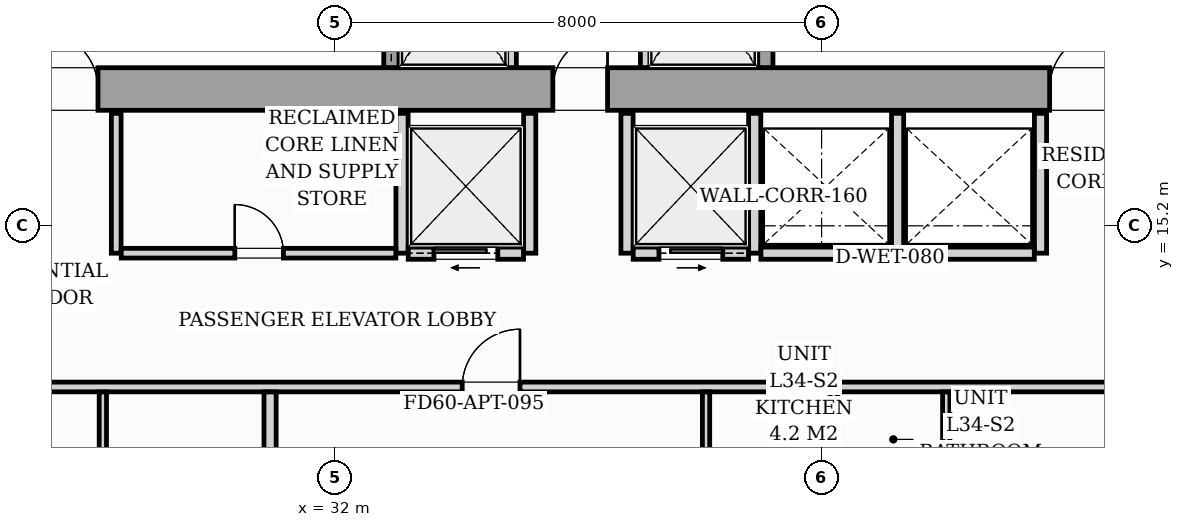
"""IFC4 building model, lengths in metres.
Left out: names, types, materials, properties, quantities, classifications, styles, units other than length and angle.
Written with IfcOpenShell. Run it as: python <this file> out.ifc"""

import sys

from ifc_helpers import new_model, si_unit, direction, frame, frame_2d, origin, origin_2d, place, context, subcontext, project, spatial, rectangle, i_section, extrude, source, transform, mapped, element, fill, save


model = new_model("IFC4")
c1 = context("Model", 3, precision=1e-05, world=origin(), true_north=direction((0.0, 1.0)))
c2 = subcontext(c1, "Body", "Model", "MODEL_VIEW")
j1 = project(units=[si_unit("LENGTHUNIT", "METRE"), si_unit("PLANEANGLEUNIT", "RADIAN")], contexts=[c1])
p1 = place(None, origin())
s1 = spatial("IfcSite", under=j1, at=p1, CompositionType="ELEMENT")
p2 = place(p1, origin())
s2 = spatial("IfcBuilding", under=s1, at=p2, CompositionType="ELEMENT")
p3 = place(p2, frame((0.0, 0.0, 119.4)))
s3 = spatial("IfcBuildingStorey", under=s2, at=p3, CompositionType="ELEMENT", Elevation=119.4)
m1 = source(origin(), c2, "Body", "SweptSolid", [
    extrude(i_section(OverallWidth=0.421, OverallDepth=0.465, WebThickness=0.045, FlangeThickness=0.073, FilletRadius=0.018, at=origin_2d()), origin(), (0.0, 0.0, 1.0), 5.196),
])
for number, where, z_axis, x_axis in (
    (1, (33.12, 17.4, 0.002), (0.0, 0.0, 1.0), (1.0, 0.0, 0.0)),
    (2, (38.88, 17.4, 0.002), (0.0, 0.0, 1.0), (1.0, 0.0, 0.0)),
):
    element("IfcColumn", number, at=place(p3, frame(where, z_axis=z_axis, x_axis=x_axis)), inside=s3, PredefinedType="PILASTER", context=c2, shape_type="MappedRepresentation", body=[
        mapped(m1, transform((0.0, 0.0, 0.0), scale=1.0)),
    ])
p4 = place(p3, frame((26.1, 17.45, 0.0), z_axis=(0.0, 0.0, 1.0), x_axis=(1.0, 0.0, 0.0)))
e3 = element("IfcWall", 3, at=p4, inside=s3, PredefinedType="SHEAR", context=c2, shape_type="SweptSolid", body=[
    extrude(rectangle(XDim=19.8, YDim=0.7, at=frame_2d((9.9, 0.0))), origin(), (0.0, 0.0, 1.0), 5.2),
])
p5 = place(p4, frame((1.05, 0.0, 0.0)))
e4 = element("IfcOpeningElement", 4, at=p5, cuts=e3, PredefinedType="OPENING", context=c2, shape_type="SweptSolid", body=[
    extrude(rectangle(XDim=0.95, YDim=2.06, at=frame_2d((0.475, 1.03))), frame((0.0, 0.36, 0.0), z_axis=(0.0, -1.0, 0.0), x_axis=(1.0, 0.0, 0.0)), (0.0, 0.0, 1.0), 0.72),
])
p6 = place(p4, frame((9.48, 0.0, 0.0)))
e5 = element("IfcOpeningElement", 5, at=p6, cuts=e3, PredefinedType="OPENING", context=c2, shape_type="SweptSolid", body=[
    extrude(rectangle(XDim=0.9, YDim=2.06, at=frame_2d((0.45, 1.03))), frame((0.0, 0.36, 0.0), z_axis=(0.0, -1.0, 0.0), x_axis=(1.0, 0.0, 0.0)), (0.0, 0.0, 1.0), 0.72),
])
p7 = place(p4, frame((17.65, 0.0, 0.0)))
e6 = element("IfcOpeningElement", 6, at=p7, cuts=e3, PredefinedType="OPENING", context=c2, shape_type="SweptSolid", body=[
    extrude(rectangle(XDim=0.95, YDim=2.06, at=frame_2d((0.475, 1.03))), frame((0.0, 0.36, 0.0), z_axis=(0.0, -1.0, 0.0), x_axis=(1.0, 0.0, 0.0)), (0.0, 0.0, 1.0), 0.72),
])
p8 = place(p3, frame((32.925, 17.802, 0.0), z_axis=(0.0, 0.0, 1.0), x_axis=(0.0, 1.0, 0.0)))
e7 = element("IfcWall", 7, at=p8, inside=s3, PredefinedType="SOLIDWALL", context=c2, shape_type="SweptSolid", body=[
    extrude(rectangle(XDim=2.646, YDim=0.25, at=frame_2d((1.323, 0.0))), origin(), (0.0, 0.0, 1.0), 5.2),
])
p9 = place(p8, frame((0.598, 0.0, 0.0)))
e8 = element("IfcOpeningElement", 8, at=p9, cuts=e7, PredefinedType="OPENING", context=c2, shape_type="SweptSolid", body=[
    extrude(rectangle(XDim=1.1, YDim=2.08, at=frame_2d((0.55, 1.04))), frame((0.0, 0.135, 0.0), z_axis=(0.0, -1.0, 0.0), x_axis=(1.0, 0.0, 0.0)), (0.0, 0.0, 1.0), 0.27),
])
for number, where, z_axis, x_axis in (
    (9, (34.9, 17.802, 0.0), (0.0, 0.0, 1.0), (0.0, 1.0, 0.0)),
    (10, (37.1, 17.802, 0.0), (0.0, 0.0, 1.0), (0.0, 1.0, 0.0)),
):
    element("IfcWall", number, at=place(p3, frame(where, z_axis=z_axis, x_axis=x_axis)), inside=s3, PredefinedType="PARTITIONING", context=c2, shape_type="SweptSolid", body=[
        extrude(rectangle(XDim=2.646, YDim=0.16, at=frame_2d((1.323, 0.0))), origin(), (0.0, 0.0, 1.0), 4.78),
    ])
p10 = place(p3, frame((39.075, 17.802, 0.0), z_axis=(0.0, 0.0, 1.0), x_axis=(0.0, 1.0, 0.0)))
e11 = element("IfcWall", 11, at=p10, inside=s3, PredefinedType="SOLIDWALL", context=c2, shape_type="SweptSolid", body=[
    extrude(rectangle(XDim=2.646, YDim=0.25, at=frame_2d((1.323, 0.0))), origin(), (0.0, 0.0, 1.0), 5.2),
])
p11 = place(p10, frame((0.598, 0.0, 0.0)))
e12 = element("IfcOpeningElement", 12, at=p11, cuts=e11, PredefinedType="OPENING", context=c2, shape_type="SweptSolid", body=[
    extrude(rectangle(XDim=1.1, YDim=2.08, at=frame_2d((0.55, 1.04))), frame((0.0, 0.135, 0.0), z_axis=(0.0, -1.0, 0.0), x_axis=(1.0, 0.0, 0.0)), (0.0, 0.0, 1.0), 0.27),
])
p12 = place(p3, frame((28.4, 14.75, 0.0), z_axis=(0.0, 0.0, 1.0), x_axis=(0.0, 1.0, 0.0)))
e13 = element("IfcWall", 13, at=p12, inside=s3, PredefinedType="PARTITIONING", context=c2, shape_type="SweptSolid", body=[
    extrude(rectangle(XDim=2.3, YDim=0.16, at=frame_2d((1.15, 0.0))), origin(), (0.0, 0.0, 1.0), 4.78),
])
p13 = place(p3, frame((33.1, 14.75, 0.0), z_axis=(0.0, 0.0, 1.0), x_axis=(0.0, 1.0, 0.0)))
e14 = element("IfcWall", 14, at=p13, inside=s3, PredefinedType="PARTITIONING", context=c2, shape_type="SweptSolid", body=[
    extrude(rectangle(XDim=2.3, YDim=0.2, at=frame_2d((1.15, 0.0))), origin(), (0.0, 0.0, 1.0), 4.78),
])
p14 = place(p3, frame((28.482, 14.75, 0.0), z_axis=(0.0, 0.0, 1.0), x_axis=(1.0, 0.0, 0.0)))
e15 = element("IfcWall", 15, at=p14, inside=s3, PredefinedType="PARTITIONING", context=c2, shape_type="SweptSolid", body=[
    extrude(rectangle(XDim=4.516, YDim=0.16, at=frame_2d((2.258, 0.0))), origin(), (0.0, 0.0, 1.0), 4.78),
])
p15 = place(p14, frame((1.868, 0.0, 0.0)))
e16 = element("IfcOpeningElement", 16, at=p15, cuts=e15, PredefinedType="OPENING", context=c2, shape_type="SweptSolid", body=[
    extrude(rectangle(XDim=0.8, YDim=2.05, at=frame_2d((0.4, 1.025))), frame((0.0, 0.09, 0.0), z_axis=(0.0, -1.0, 0.0), x_axis=(1.0, 0.0, 0.0)), (0.0, 0.0, 1.0), 0.18),
])
p16 = place(p3, frame((35.2, 14.75, 0.0), z_axis=(0.0, 0.0, 1.0), x_axis=(0.0, 1.0, 0.0)))
e17 = element("IfcWall", 17, at=p16, inside=s3, PredefinedType="PARTITIONING", context=c2, shape_type="SweptSolid", body=[
    extrude(rectangle(XDim=2.3, YDim=0.2, at=frame_2d((1.15, 0.0))), origin(), (0.0, 0.0, 1.0), 4.78),
])
p17 = place(p3, frame((33.202, 14.75, 0.0), z_axis=(0.0, 0.0, 1.0), x_axis=(1.0, 0.0, 0.0)))
e18 = element("IfcWall", 18, at=p17, inside=s3, PredefinedType="PARTITIONING", context=c2, shape_type="SweptSolid", body=[
    extrude(rectangle(XDim=1.896, YDim=0.2, at=frame_2d((0.948, 0.0))), origin(), (0.0, 0.0, 1.0), 4.78),
])
p18 = place(p17, frame((0.423, 0.0, 0.0)))
e19 = element("IfcOpeningElement", 19, at=p18, cuts=e18, PredefinedType="OPENING", context=c2, shape_type="SweptSolid", body=[
    extrude(rectangle(XDim=1.05, YDim=2.08, at=frame_2d((0.525, 1.04))), frame((0.0, 0.11, 0.0), z_axis=(0.0, -1.0, 0.0), x_axis=(1.0, 0.0, 0.0)), (0.0, 0.0, 1.0), 0.22),
])
for number, where, z_axis, x_axis in (
    (20, (36.8, 14.75, 0.0), (0.0, 0.0, 1.0), (0.0, 1.0, 0.0)),
    (21, (38.9, 14.75, 0.0), (0.0, 0.0, 1.0), (0.0, 1.0, 0.0)),
):
    element("IfcWall", number, at=place(p3, frame(where, z_axis=z_axis, x_axis=x_axis)), inside=s3, PredefinedType="PARTITIONING", context=c2, shape_type="SweptSolid", body=[
        extrude(rectangle(XDim=2.3, YDim=0.2, at=frame_2d((1.15, 0.0))), origin(), (0.0, 0.0, 1.0), 4.78),
    ])
p19 = place(p3, frame((36.902, 14.75, 0.0), z_axis=(0.0, 0.0, 1.0), x_axis=(1.0, 0.0, 0.0)))
e22 = element("IfcWall", 22, at=p19, inside=s3, PredefinedType="PARTITIONING", context=c2, shape_type="SweptSolid", body=[
    extrude(rectangle(XDim=1.896, YDim=0.2, at=frame_2d((0.948, 0.0))), origin(), (0.0, 0.0, 1.0), 4.78),
])
p20 = place(p19, frame((0.423, 0.0, 0.0)))
e23 = element("IfcOpeningElement", 23, at=p20, cuts=e22, PredefinedType="OPENING", context=c2, shape_type="SweptSolid", body=[
    extrude(rectangle(XDim=1.05, YDim=2.08, at=frame_2d((0.525, 1.04))), frame((0.0, 0.11, 0.0), z_axis=(0.0, -1.0, 0.0), x_axis=(1.0, 0.0, 0.0)), (0.0, 0.0, 1.0), 0.22),
])
for number, where, z_axis, x_axis in (
    (24, (41.25, 14.75, 0.0), (0.0, 0.0, 1.0), (0.0, 1.0, 0.0)),
    (25, (43.6, 14.75, 0.0), (0.0, 0.0, 1.0), (0.0, 1.0, 0.0)),
):
    element("IfcWall", number, at=place(p3, frame(where, z_axis=z_axis, x_axis=x_axis)), inside=s3, PredefinedType="PARTITIONING", context=c2, shape_type="SweptSolid", body=[
        extrude(rectangle(XDim=2.3, YDim=0.2, at=frame_2d((1.15, 0.0))), origin(), (0.0, 0.0, 1.0), 4.78),
    ])
for number, where, z_axis, x_axis in (
    (26, (39.002, 14.75, 0.0), (0.0, 0.0, 1.0), (1.0, 0.0, 0.0)),
    (27, (41.352, 14.75, 0.0), (0.0, 0.0, 1.0), (1.0, 0.0, 0.0)),
):
    element("IfcWall", number, at=place(p3, frame(where, z_axis=z_axis, x_axis=x_axis)), inside=s3, PredefinedType="PARTITIONING", context=c2, shape_type="SweptSolid", body=[
        extrude(rectangle(XDim=2.146, YDim=0.2, at=frame_2d((1.073, 0.0))), origin(), (0.0, 0.0, 1.0), 4.78),
    ])
p21 = place(p3, frame((22.05, 12.55, 0.0), z_axis=(0.0, 0.0, 1.0), x_axis=(1.0, 0.0, 0.0)))
e28 = element("IfcWall", 28, at=p21, inside=s3, PredefinedType="PARTITIONING", context=c2, shape_type="SweptSolid", body=[
    extrude(rectangle(XDim=23.83, YDim=0.16, at=frame_2d((11.915, 0.0))), origin(), (0.0, 0.0, 1.0), 4.78),
])
p22 = place(p21, frame((0.655, 0.0, 0.0)))
e29 = element("IfcOpeningElement", 29, at=p22, cuts=e28, PredefinedType="OPENING", context=c2, shape_type="SweptSolid", body=[
    extrude(rectangle(XDim=0.95, YDim=2.06, at=frame_2d((0.475, 1.03))), frame((0.0, 0.09, 0.0), z_axis=(0.0, -1.0, 0.0), x_axis=(1.0, 0.0, 0.0)), (0.0, 0.0, 1.0), 0.18),
])
p23 = place(p21, frame((12.04, 0.0, 0.0)))
e30 = element("IfcOpeningElement", 30, at=p23, cuts=e28, PredefinedType="OPENING", context=c2, shape_type="SweptSolid", body=[
    extrude(rectangle(XDim=0.95, YDim=2.06, at=frame_2d((0.475, 1.03))), frame((0.0, 0.09, 0.0), z_axis=(0.0, -1.0, 0.0), x_axis=(1.0, 0.0, 0.0)), (0.0, 0.0, 1.0), 0.18),
])
p24 = place(p3, frame((28.18, 7.48, 0.0), z_axis=(0.0, 0.0, 1.0), x_axis=(0.0, 1.0, 0.0)))
e31 = element("IfcWall", 31, at=p24, inside=s3, PredefinedType="PARTITIONING", context=c2, shape_type="SweptSolid", body=[
    extrude(rectangle(XDim=4.988, YDim=0.12, at=frame_2d((2.494, 0.0))), origin(), (0.0, 0.0, 1.0), 4.78),
])
p25 = place(p24, frame((1.835, 0.0, 0.0)))
e32 = element("IfcOpeningElement", 32, at=p25, cuts=e31, PredefinedType="OPENING", context=c2, shape_type="SweptSolid", body=[
    extrude(rectangle(XDim=0.9, YDim=2.05, at=frame_2d((0.45, 1.025))), frame((0.0, 0.07, 0.0), z_axis=(0.0, -1.0, 0.0), x_axis=(1.0, 0.0, 0.0)), (0.0, 0.0, 1.0), 0.14),
])
p26 = place(p3, frame((30.93, 10.401, 0.0), z_axis=(0.0, 0.0, 1.0), x_axis=(0.0, 1.0, 0.0)))
e33 = element("IfcWall", 33, at=p26, inside=s3, PredefinedType="PARTITIONING", context=c2, shape_type="SweptSolid", body=[
    extrude(rectangle(XDim=2.067, YDim=0.2, at=frame_2d((1.034, 0.0))), origin(), (0.0, 0.0, 1.0), 4.78),
])
p27 = place(p3, frame((42.05, 6.327, 0.0), z_axis=(0.0, 0.0, 1.0), x_axis=(0.0, 1.0, 0.0)))
e34 = element("IfcWall", 34, at=p27, inside=s3, PredefinedType="PARTITIONING", context=c2, shape_type="SweptSolid", body=[
    extrude(rectangle(XDim=6.141, YDim=0.12, at=frame_2d((3.07, 0.0))), origin(), (0.0, 0.0, 1.0), 4.78),
])
p28 = place(p27, frame((2.873, 0.0, 0.0)))
e35 = element("IfcOpeningElement", 35, at=p28, cuts=e34, PredefinedType="OPENING", context=c2, shape_type="SweptSolid", body=[
    extrude(rectangle(XDim=0.9, YDim=2.05, at=frame_2d((0.45, 1.025))), frame((0.0, 0.07, 0.0), z_axis=(0.0, -1.0, 0.0), x_axis=(1.0, 0.0, 0.0)), (0.0, 0.0, 1.0), 0.14),
])
for number, where, z_axis, x_axis in (
    (36, (40.2, 10.362, 0.0), (0.0, 0.0, 1.0), (0.0, 1.0, 0.0)),
    (37, (38.1, 10.362, 0.0), (0.0, 0.0, 1.0), (0.0, 1.0, 0.0)),
):
    element("IfcWall", number, at=place(p3, frame(where, z_axis=z_axis, x_axis=x_axis)), inside=s3, PredefinedType="PARTITIONING", context=c2, shape_type="SweptSolid", body=[
        extrude(rectangle(XDim=2.106, YDim=0.12, at=frame_2d((1.053, 0.0))), origin(), (0.0, 0.0, 1.0), 4.78),
    ])
m2 = source(origin(), c2, "Body", "SweptSolid", [
    extrude(rectangle(XDim=0.95, YDim=2.06, at=frame_2d((0.475, 1.03))), frame((0.0, 0.025, 0.0), z_axis=(0.0, -1.0, 0.0), x_axis=(1.0, 0.0, 0.0)), (0.0, 0.0, 1.0), 0.05),
])
p29 = place(p5, origin())
e38 = element("IfcDoor", 38, at=p29, inside=s3, OperationType="SINGLE_SWING_LEFT", PredefinedType="DOOR", context=c2, shape_type="MappedRepresentation", body=[
    mapped(m2, transform((0.0, 0.0, 0.0), scale=1.0)),
])
fill(e4, e38)
m3 = source(origin(), c2, "Body", "SweptSolid", [
    extrude(rectangle(XDim=0.9, YDim=2.06, at=frame_2d((0.45, 1.03))), frame((0.0, 0.025, 0.0), z_axis=(0.0, -1.0, 0.0), x_axis=(1.0, 0.0, 0.0)), (0.0, 0.0, 1.0), 0.05),
])
p30 = place(p6, origin())
e39 = element("IfcDoor", 39, at=p30, inside=s3, OperationType="SINGLE_SWING_RIGHT", PredefinedType="DOOR", context=c2, shape_type="MappedRepresentation", body=[
    mapped(m3, transform((0.0, 0.0, 0.0), scale=1.0)),
])
fill(e5, e39)
p31 = place(p7, origin())
e40 = element("IfcDoor", 40, at=p31, inside=s3, OperationType="SINGLE_SWING_RIGHT", PredefinedType="DOOR", context=c2, shape_type="MappedRepresentation", body=[
    mapped(m2, transform((0.0, 0.0, 0.0), scale=1.0)),
])
fill(e6, e40)
m4 = source(origin(), c2, "Body", "SweptSolid", [
    extrude(rectangle(XDim=0.8, YDim=2.05, at=frame_2d((0.4, 1.025))), frame((0.0, 0.025, 0.0), z_axis=(0.0, -1.0, 0.0), x_axis=(1.0, 0.0, 0.0)), (0.0, 0.0, 1.0), 0.05),
])
p32 = place(p15, origin())
e41 = element("IfcDoor", 41, at=p32, inside=s3, OperationType="SINGLE_SWING_LEFT", PredefinedType="DOOR", context=c2, shape_type="MappedRepresentation", body=[
    mapped(m4, transform((0.0, 0.0, 0.0), scale=1.0)),
])
fill(e16, e41)
m5 = source(origin(), c2, "Body", "SweptSolid", [
    extrude(rectangle(XDim=1.05, YDim=2.08, at=frame_2d((0.525, 1.04))), frame((0.0, 0.025, 0.0), z_axis=(0.0, -1.0, 0.0), x_axis=(1.0, 0.0, 0.0)), (0.0, 0.0, 1.0), 0.05),
])
p33 = place(p18, origin())
e42 = element("IfcDoor", 42, at=p33, inside=s3, OperationType="SLIDING_TO_LEFT", PredefinedType="DOOR", context=c2, shape_type="MappedRepresentation", body=[
    mapped(m5, transform((0.0, 0.0, 0.0), scale=1.0)),
])
fill(e19, e42)
p34 = place(p20, origin())
e43 = element("IfcDoor", 43, at=p34, inside=s3, OperationType="SLIDING_TO_RIGHT", PredefinedType="DOOR", context=c2, shape_type="MappedRepresentation", body=[
    mapped(m5, transform((0.0, 0.0, 0.0), scale=1.0)),
])
fill(e23, e43)
m6 = source(origin(), c2, "Body", "SweptSolid", [
    extrude(rectangle(XDim=0.95, YDim=2.06, at=frame_2d((0.475, 1.03))), frame((0.0, 0.025, 0.0), z_axis=(0.0, -1.0, 0.0), x_axis=(1.0, 0.0, 0.0)), (0.0, 0.0, 1.0), 0.05),
])
p35 = place(p23, origin())
e44 = element("IfcDoor", 44, at=p35, inside=s3, OperationType="SINGLE_SWING_RIGHT", PredefinedType="DOOR", context=c2, shape_type="MappedRepresentation", body=[
    mapped(m6, transform((0.0, 0.0, 0.0), scale=1.0)),
])
fill(e30, e44)
save(model, sys.argv[1])
